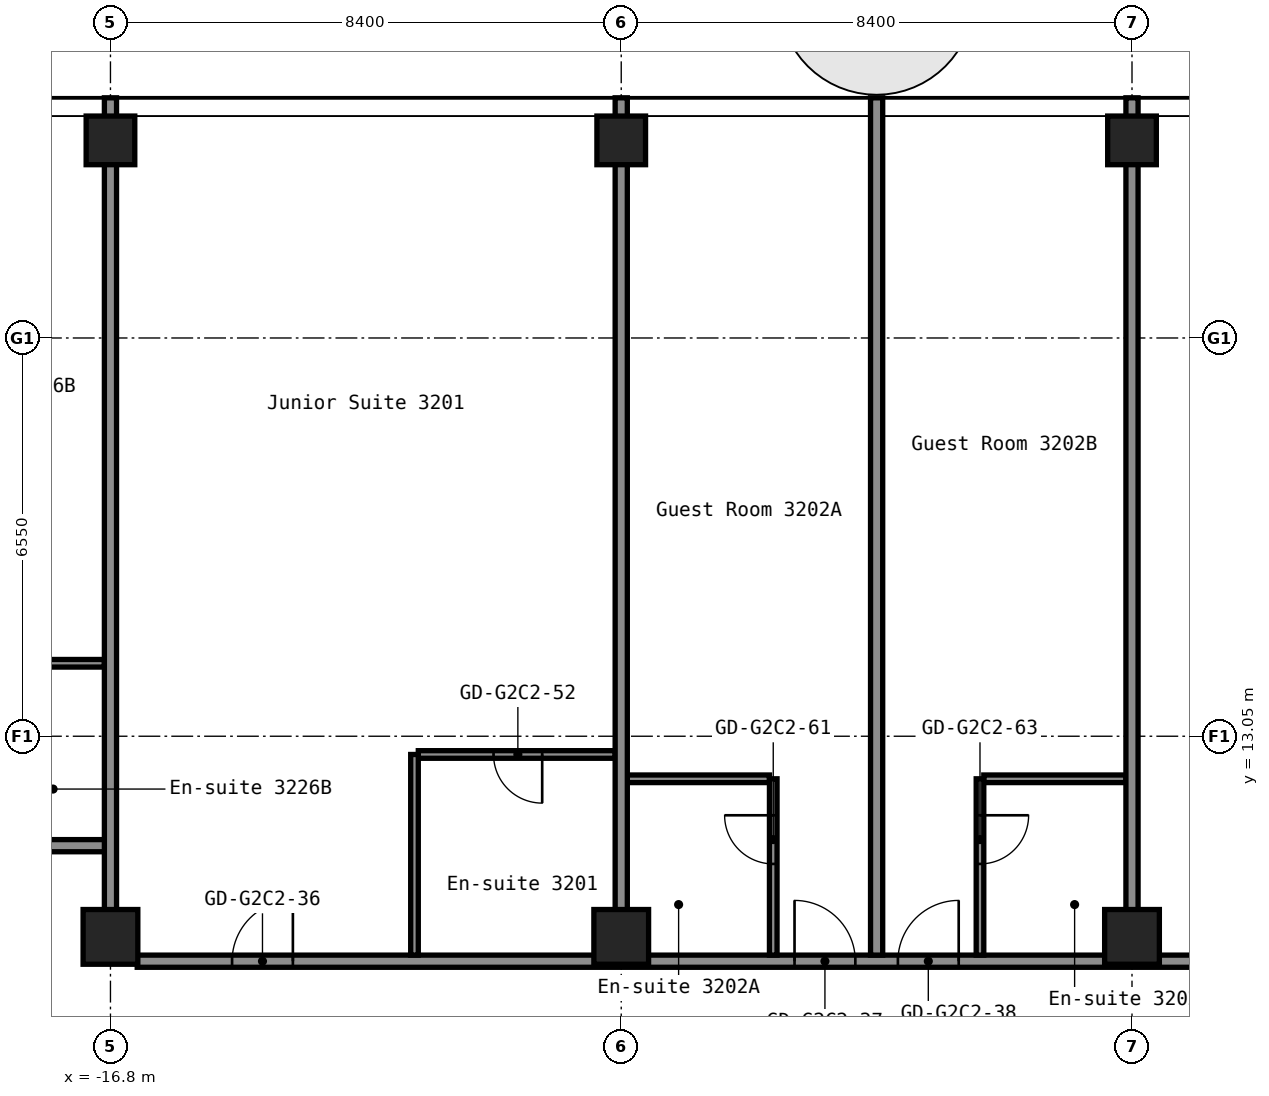
"""IFC4 building model, lengths in metres.
Left out: names, types, materials, properties, quantities, classifications, styles, units other than length and angle.
Written with IfcOpenShell. Run it as: python <this file> out.ifc"""

import sys

from ifc_helpers import new_model, si_unit, direction, frame, frame_2d, origin, origin_2d, place, context, subcontext, project, spatial, rectangle, hollow_rectangle, extrude, element, fill, save


model = new_model("IFC4")
c1 = context("Model", 3, precision=1e-05, world=origin(), true_north=direction((0.0, 1.0)))
c2 = subcontext(c1, "Body", "Model", "MODEL_VIEW")
j1 = project(units=[si_unit("LENGTHUNIT", "METRE"), si_unit("PLANEANGLEUNIT", "RADIAN")], contexts=[c1])
p1 = place(None, origin())
s1 = spatial("IfcSite", under=j1, at=p1, CompositionType="ELEMENT")
p2 = place(p1, origin())
s2 = spatial("IfcBuilding", under=s1, at=p2, CompositionType="ELEMENT")
p3 = place(p2, frame((0.0, 0.0, 113.8)))
s3 = spatial("IfcBuildingStorey", under=s2, at=p3, CompositionType="ELEMENT", Elevation=113.8)
p4 = place(p3, frame((-16.8, 9.75, 0.0), z_axis=(0.0, 0.0, 1.0), x_axis=(1.0, 0.0, 0.0)))
e1 = element("IfcColumn", 1, at=p4, inside=s3, PredefinedType="COLUMN", context=c2, shape_type="SweptSolid", body=[
    extrude(hollow_rectangle(XDim=0.9, YDim=0.9, WallThickness=0.036, at=origin_2d()), origin(), (0.0, 0.0, 1.0), 2.8),
])
p5 = place(p3, frame((-16.8, 22.85, 0.0), z_axis=(0.0, 0.0, 1.0), x_axis=(1.0, 0.0, 0.0)))
e2 = element("IfcColumn", 2, at=p5, inside=s3, PredefinedType="COLUMN", context=c2, shape_type="SweptSolid", body=[
    extrude(hollow_rectangle(XDim=0.8, YDim=0.8, WallThickness=0.032, at=origin_2d()), origin(), (0.0, 0.0, 1.0), 2.8),
])
p6 = place(p3, frame((-8.4, 9.75, 0.0), z_axis=(0.0, 0.0, 1.0), x_axis=(1.0, 0.0, 0.0)))
e3 = element("IfcColumn", 3, at=p6, inside=s3, PredefinedType="COLUMN", context=c2, shape_type="SweptSolid", body=[
    extrude(hollow_rectangle(XDim=0.9, YDim=0.9, WallThickness=0.036, at=origin_2d()), origin(), (0.0, 0.0, 1.0), 2.8),
])
p7 = place(p3, frame((-8.4, 22.85, 0.0), z_axis=(0.0, 0.0, 1.0), x_axis=(1.0, 0.0, 0.0)))
e4 = element("IfcColumn", 4, at=p7, inside=s3, PredefinedType="COLUMN", context=c2, shape_type="SweptSolid", body=[
    extrude(hollow_rectangle(XDim=0.8, YDim=0.8, WallThickness=0.032, at=origin_2d()), origin(), (0.0, 0.0, 1.0), 2.8),
])
p8 = place(p3, frame((0.0, 9.75, 0.0), z_axis=(0.0, 0.0, 1.0), x_axis=(1.0, 0.0, 0.0)))
e5 = element("IfcColumn", 5, at=p8, inside=s3, PredefinedType="COLUMN", context=c2, shape_type="SweptSolid", body=[
    extrude(hollow_rectangle(XDim=0.9, YDim=0.9, WallThickness=0.036, at=origin_2d()), origin(), (0.0, 0.0, 1.0), 2.8),
])
p9 = place(p3, frame((0.0, 22.85, 0.0), z_axis=(0.0, 0.0, 1.0), x_axis=(1.0, 0.0, 0.0)))
e6 = element("IfcColumn", 6, at=p9, inside=s3, PredefinedType="COLUMN", context=c2, shape_type="SweptSolid", body=[
    extrude(hollow_rectangle(XDim=0.8, YDim=0.8, WallThickness=0.032, at=origin_2d()), origin(), (0.0, 0.0, 1.0), 2.8),
])
p10 = place(p3, frame((-16.36, 9.35, 0.0), z_axis=(0.0, 0.0, 1.0), x_axis=(1.0, 0.0, 0.0)))
e7 = element("IfcWall", 7, at=p10, inside=s3, PredefinedType="PARTITIONING", context=c2, shape_type="SweptSolid", body=[
    extrude(rectangle(XDim=32.72, YDim=0.2, at=frame_2d((16.36, 0.0))), origin(), (0.0, 0.0, 1.0), 2.8),
])
p11 = place(p10, frame((1.56, 0.0, 0.0)))
e8 = element("IfcOpeningElement", 8, at=p11, cuts=e7, PredefinedType="OPENING", context=c2, shape_type="SweptSolid", body=[
    extrude(rectangle(XDim=1.0, YDim=2.1, at=frame_2d((0.5, 1.05))), frame((0.0, 0.11, 0.0), z_axis=(0.0, -1.0, 0.0), x_axis=(1.0, 0.0, 0.0)), (0.0, 0.0, 1.0), 0.22),
])
p12 = place(p10, frame((10.81, 0.0, 0.0)))
e9 = element("IfcOpeningElement", 9, at=p12, cuts=e7, PredefinedType="OPENING", context=c2, shape_type="SweptSolid", body=[
    extrude(rectangle(XDim=1.0, YDim=2.1, at=frame_2d((0.5, 1.05))), frame((0.0, 0.11, 0.0), z_axis=(0.0, -1.0, 0.0), x_axis=(1.0, 0.0, 0.0)), (0.0, 0.0, 1.0), 0.22),
])
p13 = place(p10, frame((12.51, 0.0, 0.0)))
e10 = element("IfcOpeningElement", 10, at=p13, cuts=e7, PredefinedType="OPENING", context=c2, shape_type="SweptSolid", body=[
    extrude(rectangle(XDim=1.0, YDim=2.1, at=frame_2d((0.5, 1.05))), frame((0.0, 0.11, 0.0), z_axis=(0.0, -1.0, 0.0), x_axis=(1.0, 0.0, 0.0)), (0.0, 0.0, 1.0), 0.22),
])
p14 = place(p10, frame((20.06, 0.0, 0.0)))
e11 = element("IfcOpeningElement", 11, at=p14, cuts=e7, PredefinedType="OPENING", context=c2, shape_type="SweptSolid", body=[
    extrude(rectangle(XDim=1.0, YDim=2.1, at=frame_2d((0.5, 1.05))), frame((0.0, 0.11, 0.0), z_axis=(0.0, -1.0, 0.0), x_axis=(1.0, 0.0, 0.0)), (0.0, 0.0, 1.0), 0.22),
])
p15 = place(p10, frame((28.46, 0.0, 0.0)))
e12 = element("IfcOpeningElement", 12, at=p15, cuts=e7, PredefinedType="OPENING", context=c2, shape_type="SweptSolid", body=[
    extrude(rectangle(XDim=1.0, YDim=2.1, at=frame_2d((0.5, 1.05))), frame((0.0, 0.11, 0.0), z_axis=(0.0, -1.0, 0.0), x_axis=(1.0, 0.0, 0.0)), (0.0, 0.0, 1.0), 0.22),
])
p16 = place(p3, frame((-46.5, 11.25, 0.0), z_axis=(0.0, 0.0, 1.0), x_axis=(1.0, 0.0, 0.0)))
e13 = element("IfcWall", 13, at=p16, inside=s3, PredefinedType="PARTITIONING", context=c2, shape_type="SweptSolid", body=[
    extrude(rectangle(XDim=29.7, YDim=0.2, at=frame_2d((14.85, 0.0))), origin(), (0.0, 0.0, 1.0), 2.8),
])
p17 = place(p16, frame((1.95, 0.0, 0.0)))
e14 = element("IfcOpeningElement", 14, at=p17, cuts=e13, PredefinedType="OPENING", context=c2, shape_type="SweptSolid", body=[
    extrude(rectangle(XDim=0.9, YDim=2.1, at=frame_2d((0.45, 1.05))), frame((0.0, 0.11, 0.0), z_axis=(0.0, -1.0, 0.0), x_axis=(1.0, 0.0, 0.0)), (0.0, 0.0, 1.0), 0.22),
])
p18 = place(p16, frame((7.35, 0.0, 0.0)))
e15 = element("IfcOpeningElement", 15, at=p18, cuts=e13, PredefinedType="OPENING", context=c2, shape_type="SweptSolid", body=[
    extrude(rectangle(XDim=1.0, YDim=2.1, at=frame_2d((0.5, 1.05))), frame((0.0, 0.11, 0.0), z_axis=(0.0, -1.0, 0.0), x_axis=(1.0, 0.0, 0.0)), (0.0, 0.0, 1.0), 0.22),
])
p19 = place(p16, frame((9.05, 0.0, 0.0)))
e16 = element("IfcOpeningElement", 16, at=p19, cuts=e13, PredefinedType="OPENING", context=c2, shape_type="SweptSolid", body=[
    extrude(rectangle(XDim=1.0, YDim=2.1, at=frame_2d((0.5, 1.05))), frame((0.0, 0.11, 0.0), z_axis=(0.0, -1.0, 0.0), x_axis=(1.0, 0.0, 0.0)), (0.0, 0.0, 1.0), 0.22),
])
p20 = place(p16, frame((18.3, 0.0, 0.0)))
e17 = element("IfcOpeningElement", 17, at=p20, cuts=e13, PredefinedType="OPENING", context=c2, shape_type="SweptSolid", body=[
    extrude(rectangle(XDim=1.0, YDim=2.1, at=frame_2d((0.5, 1.05))), frame((0.0, 0.11, 0.0), z_axis=(0.0, -1.0, 0.0), x_axis=(1.0, 0.0, 0.0)), (0.0, 0.0, 1.0), 0.22),
])
p21 = place(p16, frame((24.15, 0.0, 0.0)))
e18 = element("IfcOpeningElement", 18, at=p21, cuts=e13, PredefinedType="OPENING", context=c2, shape_type="SweptSolid", body=[
    extrude(rectangle(XDim=1.0, YDim=2.1, at=frame_2d((0.5, 1.05))), frame((0.0, 0.11, 0.0), z_axis=(0.0, -1.0, 0.0), x_axis=(1.0, 0.0, 0.0)), (0.0, 0.0, 1.0), 0.22),
])
p22 = place(p16, frame((25.85, 0.0, 0.0)))
e19 = element("IfcOpeningElement", 19, at=p22, cuts=e13, PredefinedType="OPENING", context=c2, shape_type="SweptSolid", body=[
    extrude(rectangle(XDim=1.0, YDim=2.1, at=frame_2d((0.5, 1.05))), frame((0.0, 0.11, 0.0), z_axis=(0.0, -1.0, 0.0), x_axis=(1.0, 0.0, 0.0)), (0.0, 0.0, 1.0), 0.22),
])
p23 = place(p3, frame((-8.3, 12.35, 0.0), z_axis=(0.0, 0.0, 1.0), x_axis=(1.0, 0.0, 0.0)))
e20 = element("IfcWall", 20, at=p23, inside=s3, PredefinedType="PARTITIONING", context=c2, shape_type="SweptSolid", body=[
    extrude(rectangle(XDim=2.338, YDim=0.125, at=frame_2d((1.169, 0.0))), origin(), (0.0, 0.0, 1.0), 2.8),
])
p24 = place(p3, frame((-2.438, 12.35, 0.0), z_axis=(0.0, 0.0, 1.0), x_axis=(1.0, 0.0, 0.0)))
e21 = element("IfcWall", 21, at=p24, inside=s3, PredefinedType="PARTITIONING", context=c2, shape_type="SweptSolid", body=[
    extrude(rectangle(XDim=2.337, YDim=0.125, at=frame_2d((1.169, 0.0))), origin(), (0.0, 0.0, 1.0), 2.8),
])
p25 = place(p3, frame((-11.738, 12.75, 0.0), z_axis=(0.0, 0.0, 1.0), x_axis=(1.0, 0.0, 0.0)))
e22 = element("IfcWall", 22, at=p25, inside=s3, PredefinedType="PARTITIONING", context=c2, shape_type="SweptSolid", body=[
    extrude(rectangle(XDim=3.238, YDim=0.125, at=frame_2d((1.619, 0.0))), origin(), (0.0, 0.0, 1.0), 2.8),
])
p26 = place(p25, frame((1.238, 0.0, 0.0)))
e23 = element("IfcOpeningElement", 23, at=p26, cuts=e22, PredefinedType="OPENING", context=c2, shape_type="SweptSolid", body=[
    extrude(rectangle(XDim=0.8, YDim=2.1, at=frame_2d((0.4, 1.05))), frame((0.0, 0.073, 0.0), z_axis=(0.0, -1.0, 0.0), x_axis=(1.0, 0.0, 0.0)), (0.0, 0.0, 1.0), 0.145),
])
p27 = place(p3, frame((-19.238, 14.25, 0.0), z_axis=(0.0, 0.0, 1.0), x_axis=(1.0, 0.0, 0.0)))
e24 = element("IfcWall", 24, at=p27, inside=s3, PredefinedType="PARTITIONING", context=c2, shape_type="SweptSolid", body=[
    extrude(rectangle(XDim=2.338, YDim=0.125, at=frame_2d((1.169, 0.0))), origin(), (0.0, 0.0, 1.0), 2.8),
])
p28 = place(p3, frame((-16.8, 10.19, 0.0), z_axis=(0.0, 0.0, 1.0), x_axis=(0.0, 1.0, 0.0)))
e25 = element("IfcWall", 25, at=p28, inside=s3, PredefinedType="PARTITIONING", context=c2, shape_type="SweptSolid", body=[
    extrude(rectangle(XDim=13.36, YDim=0.2, at=frame_2d((6.68, 0.0))), origin(), (0.0, 0.0, 1.0), 2.8),
])
p29 = place(p3, frame((-11.8, 9.45, 0.0), z_axis=(0.0, 0.0, 1.0), x_axis=(0.0, 1.0, 0.0)))
e26 = element("IfcWall", 26, at=p29, inside=s3, PredefinedType="PARTITIONING", context=c2, shape_type="SweptSolid", body=[
    extrude(rectangle(XDim=3.3, YDim=0.125, at=frame_2d((1.65, 0.0))), origin(), (0.0, 0.0, 1.0), 2.8),
])
p30 = place(p3, frame((-8.4, 10.19, 0.0), z_axis=(0.0, 0.0, 1.0), x_axis=(0.0, 1.0, 0.0)))
e27 = element("IfcWall", 27, at=p30, inside=s3, PredefinedType="PARTITIONING", context=c2, shape_type="SweptSolid", body=[
    extrude(rectangle(XDim=13.36, YDim=0.2, at=frame_2d((6.68, 0.0))), origin(), (0.0, 0.0, 1.0), 2.8),
])
p31 = place(p3, frame((-5.9, 9.45, 0.0), z_axis=(0.0, 0.0, 1.0), x_axis=(0.0, 1.0, 0.0)))
e28 = element("IfcWall", 28, at=p31, inside=s3, PredefinedType="PARTITIONING", context=c2, shape_type="SweptSolid", body=[
    extrude(rectangle(XDim=2.9, YDim=0.125, at=frame_2d((1.45, 0.0))), origin(), (0.0, 0.0, 1.0), 2.8),
])
p32 = place(p31, frame((1.5, 0.0, 0.0)))
e29 = element("IfcOpeningElement", 29, at=p32, cuts=e28, PredefinedType="OPENING", context=c2, shape_type="SweptSolid", body=[
    extrude(rectangle(XDim=0.8, YDim=2.1, at=frame_2d((0.4, 1.05))), frame((0.0, 0.073, 0.0), z_axis=(0.0, -1.0, 0.0), x_axis=(1.0, 0.0, 0.0)), (0.0, 0.0, 1.0), 0.145),
])
p33 = place(p3, frame((-4.2, 9.45, 0.0), z_axis=(0.0, 0.0, 1.0), x_axis=(0.0, 1.0, 0.0)))
e30 = element("IfcWall", 30, at=p33, inside=s3, PredefinedType="PARTITIONING", context=c2, shape_type="SweptSolid", body=[
    extrude(rectangle(XDim=14.1, YDim=0.2, at=frame_2d((7.05, 0.0))), origin(), (0.0, 0.0, 1.0), 2.8),
])
p34 = place(p3, frame((-2.5, 9.45, 0.0), z_axis=(0.0, 0.0, 1.0), x_axis=(0.0, 1.0, 0.0)))
e31 = element("IfcWall", 31, at=p34, inside=s3, PredefinedType="PARTITIONING", context=c2, shape_type="SweptSolid", body=[
    extrude(rectangle(XDim=2.9, YDim=0.125, at=frame_2d((1.45, 0.0))), origin(), (0.0, 0.0, 1.0), 2.8),
])
p35 = place(p34, frame((1.5, 0.0, 0.0)))
e32 = element("IfcOpeningElement", 32, at=p35, cuts=e31, PredefinedType="OPENING", context=c2, shape_type="SweptSolid", body=[
    extrude(rectangle(XDim=0.8, YDim=2.1, at=frame_2d((0.4, 1.05))), frame((0.0, 0.073, 0.0), z_axis=(0.0, -1.0, 0.0), x_axis=(1.0, 0.0, 0.0)), (0.0, 0.0, 1.0), 0.145),
])
p36 = place(p3, frame((0.0, 10.19, 0.0), z_axis=(0.0, 0.0, 1.0), x_axis=(0.0, 1.0, 0.0)))
e33 = element("IfcWall", 33, at=p36, inside=s3, PredefinedType="PARTITIONING", context=c2, shape_type="SweptSolid", body=[
    extrude(rectangle(XDim=13.36, YDim=0.2, at=frame_2d((6.68, 0.0))), origin(), (0.0, 0.0, 1.0), 2.8),
])
p37 = place(p11, origin())
e34 = element("IfcDoor", 34, at=p37, inside=s3, OperationType="SINGLE_SWING_LEFT", PredefinedType="DOOR", context=c2, shape_type="SweptSolid", body=[
    extrude(rectangle(XDim=1.0, YDim=2.1, at=frame_2d((0.5, 1.05))), frame((0.0, 0.025, 0.0), z_axis=(0.0, -1.0, 0.0), x_axis=(1.0, 0.0, 0.0)), (0.0, 0.0, 1.0), 0.05),
])
fill(e8, e34)
p38 = place(p12, origin())
e35 = element("IfcDoor", 35, at=p38, inside=s3, OperationType="SINGLE_SWING_RIGHT", PredefinedType="DOOR", context=c2, shape_type="SweptSolid", body=[
    extrude(rectangle(XDim=1.0, YDim=2.1, at=frame_2d((0.5, 1.05))), frame((0.0, 0.025, 0.0), z_axis=(0.0, -1.0, 0.0), x_axis=(1.0, 0.0, 0.0)), (0.0, 0.0, 1.0), 0.05),
])
fill(e9, e35)
p39 = place(p13, origin())
e36 = element("IfcDoor", 36, at=p39, inside=s3, OperationType="SINGLE_SWING_LEFT", PredefinedType="DOOR", context=c2, shape_type="SweptSolid", body=[
    extrude(rectangle(XDim=1.0, YDim=2.1, at=frame_2d((0.5, 1.05))), frame((0.0, 0.025, 0.0), z_axis=(0.0, -1.0, 0.0), x_axis=(1.0, 0.0, 0.0)), (0.0, 0.0, 1.0), 0.05),
])
fill(e10, e36)
p40 = place(p26, origin())
e37 = element("IfcDoor", 37, at=p40, inside=s3, OperationType="SINGLE_SWING_RIGHT", PredefinedType="DOOR", context=c2, shape_type="SweptSolid", body=[
    extrude(rectangle(XDim=0.8, YDim=2.1, at=frame_2d((0.4, 1.05))), frame((0.0, 0.025, 0.0), z_axis=(0.0, -1.0, 0.0), x_axis=(1.0, 0.0, 0.0)), (0.0, 0.0, 1.0), 0.05),
])
fill(e23, e37)
p41 = place(p32, origin())
e38 = element("IfcDoor", 38, at=p41, inside=s3, OperationType="SINGLE_SWING_LEFT", PredefinedType="DOOR", context=c2, shape_type="SweptSolid", body=[
    extrude(rectangle(XDim=0.8, YDim=2.1, at=frame_2d((0.4, 1.05))), frame((0.0, 0.025, 0.0), z_axis=(0.0, -1.0, 0.0), x_axis=(1.0, 0.0, 0.0)), (0.0, 0.0, 1.0), 0.05),
])
fill(e29, e38)
p42 = place(p35, origin())
e39 = element("IfcDoor", 39, at=p42, inside=s3, OperationType="SINGLE_SWING_RIGHT", PredefinedType="DOOR", context=c2, shape_type="SweptSolid", body=[
    extrude(rectangle(XDim=0.8, YDim=2.1, at=frame_2d((0.4, 1.05))), frame((0.0, 0.025, 0.0), z_axis=(0.0, -1.0, 0.0), x_axis=(1.0, 0.0, 0.0)), (0.0, 0.0, 1.0), 0.05),
])
fill(e32, e39)
save(model, sys.argv[1])
